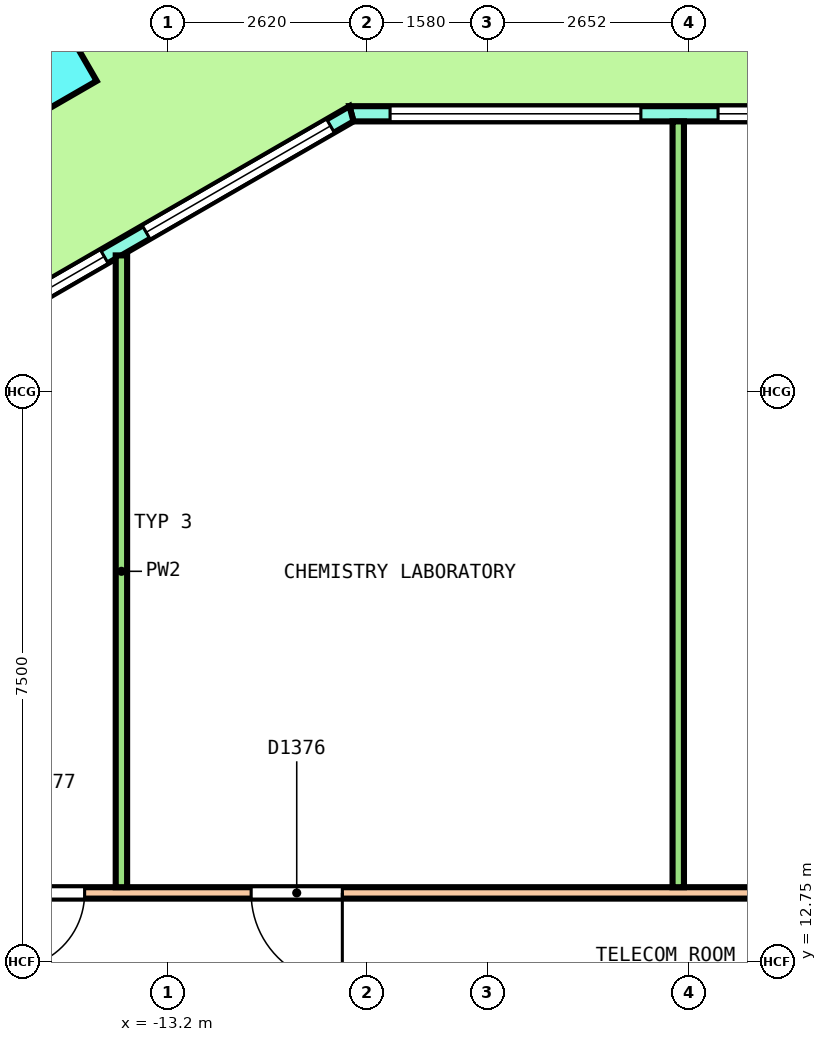
"""IFC4 building model, lengths in metres.
Left out: names, types, materials, properties, quantities, classifications, styles, units other than length and angle.
Written with IfcOpenShell. Run it as: python <this file> out.ifc"""

import sys

from ifc_helpers import new_model, si_unit, direction, frame, frame_2d, origin, origin_2d, place, context, subcontext, project, spatial, polyline, rectangle, outline, extrude, element, fill, save


model = new_model("IFC4")
c1 = context("Model", 3, precision=1e-05, world=origin(), true_north=direction((0.0, 1.0)))
c2 = subcontext(c1, "Body", "Model", "MODEL_VIEW")
j1 = project(units=[si_unit("LENGTHUNIT", "METRE"), si_unit("PLANEANGLEUNIT", "RADIAN")], contexts=[c1])
p1 = place(None, origin())
s1 = spatial("IfcSite", under=j1, at=p1, CompositionType="ELEMENT")
p2 = place(p1, origin())
s2 = spatial("IfcBuilding", under=s1, at=p2, CompositionType="ELEMENT")
p3 = place(p2, frame((0.0, 0.0, 41.0)))
s3 = spatial("IfcBuildingStorey", under=s2, at=p3, CompositionType="ELEMENT", Elevation=41.0)
p4 = place(p3, frame((-15.164, 24.606, 0.0), z_axis=(-0.036265236264, 0.0, 0.999342199969), x_axis=(-0.865313546461, -0.500246354177, -0.031401456084)))
e1 = element("IfcColumn", 1, at=p4, inside=s3, PredefinedType="COLUMN", context=c2, shape_type="SweptSolid", body=[
    extrude(rectangle(XDim=1.5, YDim=1.5, at=origin_2d()), origin(), (0.0, 0.0, 1.0), 4.053),
])
p5 = place(p3, frame((10.788, 23.9, 0.0), z_axis=(0.0, 0.0, 1.0), x_axis=(-1.0, 0.0, 0.0)))
e2 = element("IfcWall", 2, at=p5, inside=s3, PredefinedType="SOLIDWALL", context=c2, shape_type="SweptSolid", body=[
    extrude(outline(polyline([(-0.027, -0.1), (1.003, -0.1), (2.033, -0.1), (3.063, -0.1), (4.093, -0.1), (5.123, -0.1), (6.153, -0.1), (7.183, -0.1), (8.213, -0.1), (9.243, -0.1), (10.273, -0.1), (11.302, -0.1), (12.333, -0.1), (13.363, -0.1), (14.392, -0.1), (15.422, -0.1), (16.452, -0.1), (17.482, -0.1), (18.512, -0.1), (19.542, -0.1), (20.572, -0.1), (21.602, -0.1), (21.548, 0.1), (20.523, 0.1), (19.499, 0.1), (18.474, 0.1), (17.449, 0.1), (16.424, 0.1), (15.399, 0.1), (14.375, 0.1), (13.35, 0.1), (12.325, 0.1), (11.3, 0.1), (10.275, 0.1), (9.25, 0.1), (8.226, 0.1), (7.201, 0.1), (6.176, 0.1), (5.151, 0.1), (4.126, 0.1), (3.101, 0.1), (2.076, 0.1), (1.052, 0.1), (0.027, 0.1), (-0.027, -0.1)])), origin(), (0.0, 0.0, 1.0), 4.1),
])
p6 = place(p5, frame((0.508, 0.0, 0.1)))
e3 = element("IfcOpeningElement", 3, at=p6, cuts=e2, PredefinedType="OPENING", context=c2, shape_type="SweptSolid", body=[
    extrude(rectangle(XDim=3.3, YDim=2.9, at=frame_2d((1.65, 1.45))), frame((0.0, 0.11, 0.0), z_axis=(0.0, -1.0, 0.0), x_axis=(1.0, 0.0, 0.0)), (0.0, 0.0, 1.0), 0.22),
])
p7 = place(p5, frame((4.823, 0.0, 0.1)))
e4 = element("IfcOpeningElement", 4, at=p7, cuts=e2, PredefinedType="OPENING", context=c2, shape_type="SweptSolid", body=[
    extrude(rectangle(XDim=3.3, YDim=2.9, at=frame_2d((1.65, 1.45))), frame((0.0, 0.11, 0.0), z_axis=(0.0, -1.0, 0.0), x_axis=(1.0, 0.0, 0.0)), (0.0, 0.0, 1.0), 0.22),
])
p8 = place(p5, frame((9.888, 0.0, 0.0)))
e5 = element("IfcOpeningElement", 5, at=p8, cuts=e2, PredefinedType="OPENING", context=c2, shape_type="SweptSolid", body=[
    extrude(rectangle(XDim=1.8, YDim=2.4, at=frame_2d((0.9, 1.2))), frame((0.0, 0.11, 0.0), z_axis=(0.0, -1.0, 0.0), x_axis=(1.0, 0.0, 0.0)), (0.0, 0.0, 1.0), 0.22),
])
p9 = place(p5, frame((9.888, 0.0, 2.55)))
e6 = element("IfcOpeningElement", 6, at=p9, cuts=e2, PredefinedType="OPENING", context=c2, shape_type="SweptSolid", body=[
    extrude(rectangle(XDim=1.8, YDim=0.45, at=frame_2d((0.9, 0.225))), frame((0.0, 0.11, 0.0), z_axis=(0.0, -1.0, 0.0), x_axis=(1.0, 0.0, 0.0)), (0.0, 0.0, 1.0), 0.22),
])
p10 = place(p5, frame((13.453, 0.0, 0.1)))
e7 = element("IfcOpeningElement", 7, at=p10, cuts=e2, PredefinedType="OPENING", context=c2, shape_type="SweptSolid", body=[
    extrude(rectangle(XDim=3.3, YDim=2.9, at=frame_2d((1.65, 1.45))), frame((0.0, 0.11, 0.0), z_axis=(0.0, -1.0, 0.0), x_axis=(1.0, 0.0, 0.0)), (0.0, 0.0, 1.0), 0.22),
])
p11 = place(p5, frame((17.768, 0.0, 0.1)))
e8 = element("IfcOpeningElement", 8, at=p11, cuts=e2, PredefinedType="OPENING", context=c2, shape_type="SweptSolid", body=[
    extrude(rectangle(XDim=3.3, YDim=2.9, at=frame_2d((1.65, 1.45))), frame((0.0, 0.11, 0.0), z_axis=(0.0, -1.0, 0.0), x_axis=(1.0, 0.0, 0.0)), (0.0, 0.0, 1.0), 0.22),
])
p12 = place(p3, frame((-10.788, 23.9, 0.0), z_axis=(0.0, 0.0, 1.0), x_axis=(-0.866029458321, -0.49999297727, 0.0)))
e9 = element("IfcWall", 9, at=p12, inside=s3, PredefinedType="SOLIDWALL", context=c2, shape_type="SweptSolid", body=[
    extrude(outline(polyline([(-0.027, -0.1), (1.128, -0.1), (2.282, -0.1), (3.437, -0.1), (4.592, -0.1), (5.747, -0.1), (6.901, -0.1), (6.848, 0.1), (5.711, 0.1), (4.574, 0.1), (3.437, 0.1), (2.301, 0.1), (1.164, 0.1), (0.027, 0.1), (-0.027, -0.1)])), origin(), (0.0, 0.0, 1.0), 4.1),
])
p13 = place(p12, frame((0.319, 0.0, 0.1)))
e10 = element("IfcOpeningElement", 10, at=p13, cuts=e9, PredefinedType="OPENING", context=c2, shape_type="SweptSolid", body=[
    extrude(rectangle(XDim=2.8, YDim=2.9, at=frame_2d((1.4, 1.45))), frame((0.0, 0.11, 0.0), z_axis=(0.0, -1.0, 0.0), x_axis=(1.0, 0.0, 0.0)), (0.0, 0.0, 1.0), 0.22),
])
p14 = place(p12, frame((3.756, 0.0, 0.1)))
e11 = element("IfcOpeningElement", 11, at=p14, cuts=e9, PredefinedType="OPENING", context=c2, shape_type="SweptSolid", body=[
    extrude(rectangle(XDim=2.8, YDim=2.9, at=frame_2d((1.4, 1.45))), frame((0.0, 0.11, 0.0), z_axis=(0.0, -1.0, 0.0), x_axis=(1.0, 0.0, 0.0)), (0.0, 0.0, 1.0), 0.22),
])
p15 = place(p3, frame((-15.975, 13.65, 0.0), z_axis=(0.0, 0.0, 1.0), x_axis=(1.0, 0.0, 0.0)))
e12 = element("IfcWall", 12, at=p15, inside=s3, PredefinedType="PARTITIONING", context=c2, shape_type="SweptSolid", body=[
    extrude(rectangle(XDim=31.95, YDim=0.15, at=frame_2d((15.975, 0.0))), origin(), (0.0, 0.0, 1.0), 3.05),
])
p16 = place(p15, frame((29.308, 0.0, 0.0)))
e13 = element("IfcOpeningElement", 13, at=p16, cuts=e12, PredefinedType="OPENING", context=c2, shape_type="SweptSolid", body=[
    extrude(rectangle(XDim=1.2, YDim=2.1, at=frame_2d((0.6, 1.05))), frame((0.0, 0.085, 0.0), z_axis=(0.0, -1.0, 0.0), x_axis=(1.0, 0.0, 0.0)), (0.0, 0.0, 1.0), 0.17),
])
p17 = place(p15, frame((17.538, 0.0, 0.0)))
e14 = element("IfcOpeningElement", 14, at=p17, cuts=e12, PredefinedType="OPENING", context=c2, shape_type="SweptSolid", body=[
    extrude(rectangle(XDim=1.2, YDim=2.1, at=frame_2d((0.6, 1.05))), frame((0.0, 0.085, 0.0), z_axis=(0.0, -1.0, 0.0), x_axis=(1.0, 0.0, 0.0)), (0.0, 0.0, 1.0), 0.17),
])
p18 = place(p15, frame((3.867, 0.0, 0.0)))
e15 = element("IfcOpeningElement", 15, at=p18, cuts=e12, PredefinedType="OPENING", context=c2, shape_type="SweptSolid", body=[
    extrude(rectangle(XDim=1.2, YDim=2.1, at=frame_2d((0.6, 1.05))), frame((0.0, 0.085, 0.0), z_axis=(0.0, -1.0, 0.0), x_axis=(1.0, 0.0, 0.0)), (0.0, 0.0, 1.0), 0.17),
])
p19 = place(p15, frame((0.677, 0.0, 0.0)))
e16 = element("IfcOpeningElement", 16, at=p19, cuts=e12, PredefinedType="OPENING", context=c2, shape_type="SweptSolid", body=[
    extrude(rectangle(XDim=1.0, YDim=2.1, at=frame_2d((0.5, 1.05))), frame((0.0, 0.085, 0.0), z_axis=(0.0, -1.0, 0.0), x_axis=(1.0, 0.0, 0.0)), (0.0, 0.0, 1.0), 0.17),
])
p20 = place(p3, frame((-6.489, 13.725, 0.0), z_axis=(0.0, 0.0, 1.0), x_axis=(0.0, 1.0, 0.0)))
e17 = element("IfcWall", 17, at=p20, inside=s3, PredefinedType="PARTITIONING", context=c2, shape_type="SweptSolid", body=[
    extrude(rectangle(XDim=10.075, YDim=0.15, at=frame_2d((5.038, 0.0))), origin(), (0.0, 0.0, 1.0), 3.05),
])
p21 = place(p3, frame((-13.814, 13.725, 0.0), z_axis=(0.0, 0.0, 1.0), x_axis=(0.0, 1.0, 0.0)))
e18 = element("IfcWall", 18, at=p21, inside=s3, PredefinedType="PARTITIONING", context=c2, shape_type="SweptSolid", body=[
    extrude(rectangle(XDim=8.312, YDim=0.15, at=frame_2d((4.156, 0.0))), origin(), (0.0, 0.0, 1.0), 3.05),
])
p22 = place(p10, origin())
e19 = element("IfcWindow", 19, at=p22, inside=s3, PartitioningType="SINGLE_PANEL", PredefinedType="WINDOW", context=c2, shape_type="SweptSolid", body=[
    extrude(rectangle(XDim=3.3, YDim=2.9, at=frame_2d((1.65, 1.45))), frame((0.0, 0.03, 0.0), z_axis=(0.0, -1.0, 0.0), x_axis=(1.0, 0.0, 0.0)), (0.0, 0.0, 1.0), 0.06),
])
fill(e7, e19)
p23 = place(p11, origin())
e20 = element("IfcWindow", 20, at=p23, inside=s3, PartitioningType="SINGLE_PANEL", PredefinedType="WINDOW", context=c2, shape_type="SweptSolid", body=[
    extrude(rectangle(XDim=3.3, YDim=2.9, at=frame_2d((1.65, 1.45))), frame((0.0, 0.03, 0.0), z_axis=(0.0, -1.0, 0.0), x_axis=(1.0, 0.0, 0.0)), (0.0, 0.0, 1.0), 0.06),
])
fill(e8, e20)
p24 = place(p13, origin())
e21 = element("IfcWindow", 21, at=p24, inside=s3, PartitioningType="SINGLE_PANEL", PredefinedType="WINDOW", context=c2, shape_type="SweptSolid", body=[
    extrude(rectangle(XDim=2.8, YDim=2.9, at=frame_2d((1.4, 1.45))), frame((0.0, 0.03, 0.0), z_axis=(0.0, -1.0, 0.0), x_axis=(1.0, 0.0, 0.0)), (0.0, 0.0, 1.0), 0.06),
])
fill(e10, e21)
p25 = place(p14, origin())
e22 = element("IfcWindow", 22, at=p25, inside=s3, PartitioningType="SINGLE_PANEL", PredefinedType="WINDOW", context=c2, shape_type="SweptSolid", body=[
    extrude(rectangle(XDim=2.8, YDim=2.9, at=frame_2d((1.4, 1.45))), frame((0.0, 0.03, 0.0), z_axis=(0.0, -1.0, 0.0), x_axis=(1.0, 0.0, 0.0)), (0.0, 0.0, 1.0), 0.06),
])
fill(e11, e22)
p26 = place(p18, origin())
e23 = element("IfcDoor", 23, at=p26, inside=s3, OperationType="DOUBLE_DOOR_SINGLE_SWING", PredefinedType="DOOR", context=c2, shape_type="SweptSolid", body=[
    extrude(rectangle(XDim=1.2, YDim=2.1, at=frame_2d((0.6, 1.05))), frame((0.0, 0.025, 0.0), z_axis=(0.0, -1.0, 0.0), x_axis=(1.0, 0.0, 0.0)), (0.0, 0.0, 1.0), 0.05),
])
fill(e15, e23)
p27 = place(p19, origin())
e24 = element("IfcDoor", 24, at=p27, inside=s3, OperationType="SINGLE_SWING_RIGHT", PredefinedType="DOOR", context=c2, shape_type="SweptSolid", body=[
    extrude(rectangle(XDim=1.0, YDim=2.1, at=frame_2d((0.5, 1.05))), frame((0.0, 0.025, 0.0), z_axis=(0.0, -1.0, 0.0), x_axis=(1.0, 0.0, 0.0)), (0.0, 0.0, 1.0), 0.05),
])
fill(e16, e24)
save(model, sys.argv[1])
